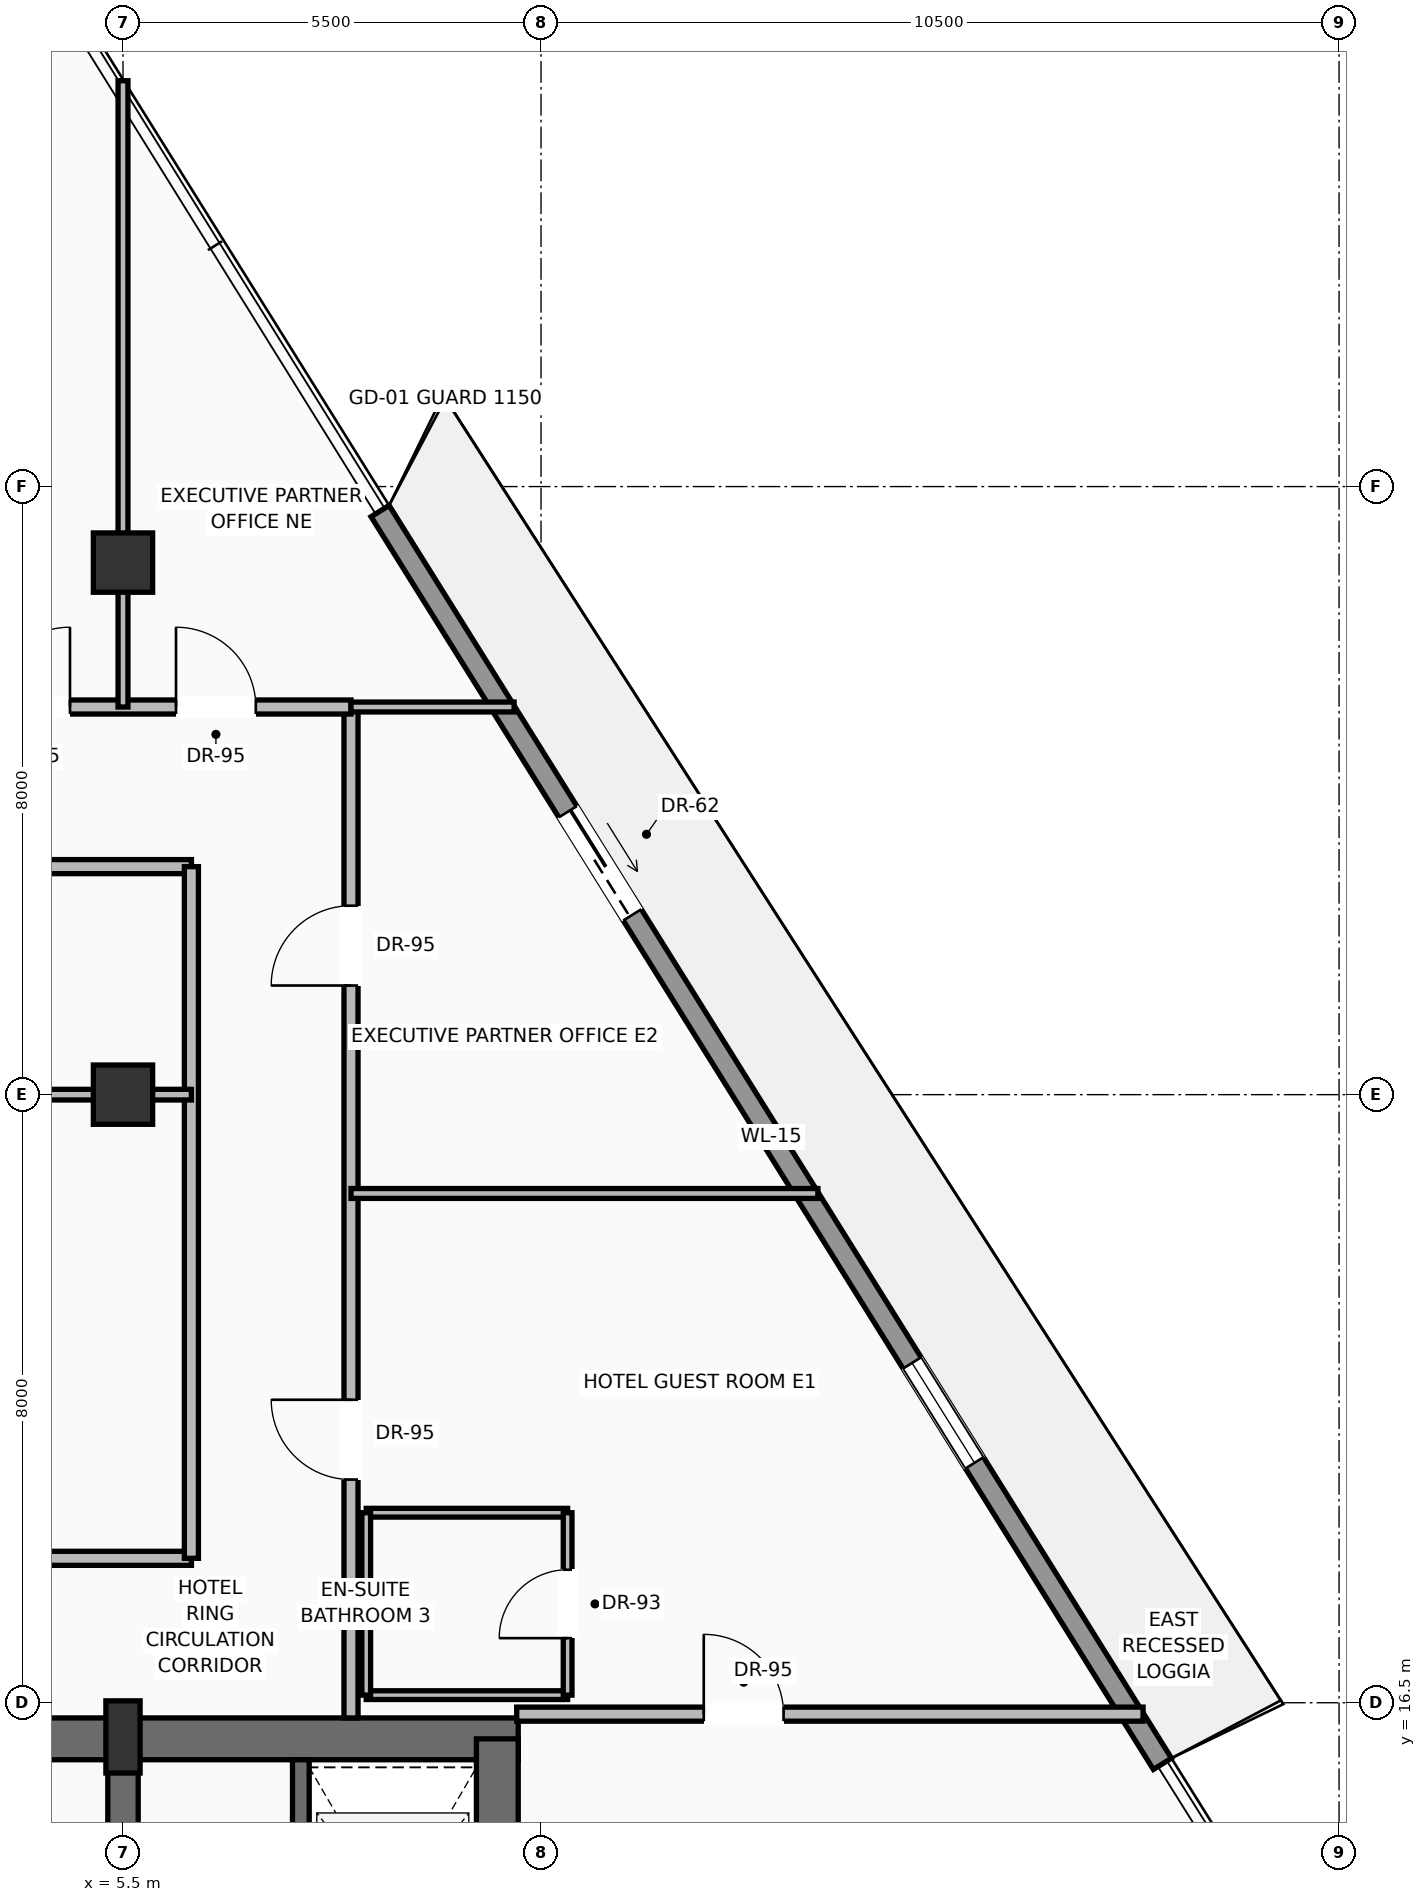
"""IFC4 building model, lengths in metres.
Left out: names, types, materials, properties, quantities, classifications, styles, units other than length and angle.
Written with IfcOpenShell. Run it as: python <this file> out.ifc"""

import sys

from ifc_helpers import new_model, si_unit, direction, frame, frame_2d, origin, origin_2d, place, context, subcontext, project, spatial, rectangle, extrude, source, transform, mapped, element, fill, save


model = new_model("IFC4")
c1 = context("Model", 3, precision=1e-05, world=origin(), true_north=direction((0.0, 1.0)))
c2 = subcontext(c1, "Body", "Model", "MODEL_VIEW")
j1 = project(units=[si_unit("LENGTHUNIT", "METRE"), si_unit("PLANEANGLEUNIT", "RADIAN")], contexts=[c1])
p1 = place(None, origin())
s1 = spatial("IfcSite", under=j1, at=p1, CompositionType="ELEMENT")
p2 = place(p1, origin())
s2 = spatial("IfcBuilding", under=s1, at=p2, CompositionType="ELEMENT")
p3 = place(p2, frame((0.0, 0.0, 223.45)))
s3 = spatial("IfcBuildingStorey", under=s2, at=p3, CompositionType="ELEMENT", Elevation=223.45)
p4 = place(p3, frame((-10.7, 16.025, 0.0), z_axis=(0.0, 0.0, 1.0), x_axis=(1.0, 0.0, 0.0)))
e1 = element("IfcWall", 1, at=p4, inside=s3, PredefinedType="SHEAR", context=c2, shape_type="SweptSolid", body=[
    extrude(rectangle(XDim=21.4, YDim=0.55, at=frame_2d((10.7, 0.0))), origin(), (0.0, 0.0, 1.0), 3.24),
])
p5 = place(p4, frame((3.27, 0.0, 0.0)))
e2 = element("IfcOpeningElement", 2, at=p5, cuts=e1, PredefinedType="OPENING", context=c2, shape_type="SweptSolid", body=[
    extrude(rectangle(XDim=1.3, YDim=2.3, at=frame_2d((0.65, 1.15))), frame((0.0, 0.285, 0.0), z_axis=(0.0, -1.0, 0.0), x_axis=(1.0, 0.0, 0.0)), (0.0, 0.0, 1.0), 0.57),
])
p6 = place(p4, frame((9.7, 0.0, 0.0)))
e3 = element("IfcOpeningElement", 3, at=p6, cuts=e1, PredefinedType="OPENING", context=c2, shape_type="SweptSolid", body=[
    extrude(rectangle(XDim=2.0, YDim=2.4, at=frame_2d((1.0, 1.2))), frame((0.0, 0.285, 0.0), z_axis=(0.0, -1.0, 0.0), x_axis=(1.0, 0.0, 0.0)), (0.0, 0.0, 1.0), 0.57),
])
p7 = place(p3, frame((10.425, 0.575, 0.0), z_axis=(0.0, 0.0, 1.0), x_axis=(0.0, 1.0, 0.0)))
e4 = element("IfcWall", 4, at=p7, inside=s3, PredefinedType="SHEAR", context=c2, shape_type="SweptSolid", body=[
    extrude(rectangle(XDim=15.45, YDim=0.55, at=frame_2d((7.725, 0.0))), origin(), (0.0, 0.0, 1.0), 3.24),
])
p8 = place(p3, frame((5.5, 0.575, 0.0), z_axis=(0.0, 0.0, 1.0), x_axis=(0.0, 1.0, 0.0)))
e5 = element("IfcWall", 5, at=p8, inside=s3, PredefinedType="SHEAR", context=c2, shape_type="SweptSolid", body=[
    extrude(rectangle(XDim=15.45, YDim=0.4, at=frame_2d((7.725, 0.0))), origin(), (0.0, 0.0, 1.0), 3.24),
])
p9 = place(p8, frame((8.925, 0.0, 0.0)))
e6 = element("IfcOpeningElement", 6, at=p9, cuts=e5, PredefinedType="OPENING", context=c2, shape_type="SweptSolid", body=[
    extrude(rectangle(XDim=1.1, YDim=2.2, at=frame_2d((0.55, 1.1))), frame((0.0, 0.21, 0.0), z_axis=(0.0, -1.0, 0.0), x_axis=(1.0, 0.0, 0.0)), (0.0, 0.0, 1.0), 0.42),
])
m1 = source(origin(), c2, "Body", "SweptSolid", [
    extrude(rectangle(XDim=0.45, YDim=0.95, at=origin_2d()), origin(), (0.0, 0.0, 1.0), 3.45),
])
p10 = place(p3, frame((5.5, 16.05, 0.0), z_axis=(0.0, 0.0, 1.0), x_axis=(1.0, 0.0, 0.0)))
e7 = element("IfcColumn", 7, at=p10, inside=s3, PredefinedType="PILASTER", context=c2, shape_type="MappedRepresentation", body=[
    mapped(m1, transform((0.0, 0.0, 0.0), scale=1.0)),
])
m2 = source(origin(), c2, "Body", "SweptSolid", [
    extrude(rectangle(XDim=0.78, YDim=0.78, at=origin_2d()), origin(), (0.0, 0.0, 1.0), 3.45),
])
for number, where, z_axis, x_axis in (
    (8, (5.5, 24.5, 0.0), (0.0, 0.0, 1.0), (1.0, 0.0, 0.0)),
    (9, (5.5, 31.5, 0.0), (0.0, 0.0, 1.0), (1.0, 0.0, 0.0)),
):
    element("IfcColumn", number, at=place(p3, frame(where, z_axis=z_axis, x_axis=x_axis)), inside=s3, PredefinedType="COLUMN", context=c2, shape_type="MappedRepresentation", body=[
        mapped(m2, transform((0.0, 0.0, 0.0), scale=1.0)),
    ])
p11 = place(p3, frame((8.883, 32.178, 0.0), z_axis=(0.0, 0.0, 1.0), x_axis=(0.529719957473, -0.848172604282, 0.0)))
e10 = element("IfcWall", 10, at=p11, inside=s3, PredefinedType="SOLIDWALL", context=c2, shape_type="SweptSolid", body=[
    extrude(rectangle(XDim=19.431, YDim=0.28, at=frame_2d((9.716, 0.0))), origin(), (0.0, 0.0, 1.0), 2.82),
])
p12 = place(p11, frame((4.664, 0.0, 0.0)))
e11 = element("IfcOpeningElement", 11, at=p12, cuts=e10, PredefinedType="OPENING", context=c2, shape_type="SweptSolid", body=[
    extrude(rectangle(XDim=1.6, YDim=2.35, at=frame_2d((0.8, 1.175))), frame((0.0, 0.15, 0.0), z_axis=(0.0, -1.0, 0.0), x_axis=(1.0, 0.0, 0.0)), (0.0, 0.0, 1.0), 0.3),
])
p13 = place(p11, frame((13.213, 0.0, 0.9)))
e12 = element("IfcOpeningElement", 12, at=p13, cuts=e10, PredefinedType="OPENING", context=c2, shape_type="SweptSolid", body=[
    extrude(rectangle(XDim=1.55, YDim=1.75, at=frame_2d((0.775, 0.875))), frame((0.0, 0.15, 0.0), z_axis=(0.0, -1.0, 0.0), x_axis=(1.0, 0.0, 0.0)), (0.0, 0.0, 1.0), 0.3),
])
p14 = place(p3, frame((7.84, 11.87, 0.0), z_axis=(0.0, 0.0, 1.0), x_axis=(0.0, 1.0, 0.0)))
e13 = element("IfcWall", 13, at=p14, inside=s3, PredefinedType="SOLIDWALL", context=c2, shape_type="SweptSolid", body=[
    extrude(rectangle(XDim=3.88, YDim=0.22, at=frame_2d((1.94, 0.0))), origin(), (0.0, 0.0, 1.0), 3.24),
])
p15 = place(p3, frame((-6.4, 18.4, 0.0), z_axis=(0.0, 0.0, 1.0), x_axis=(1.0, 0.0, 0.0)))
e14 = element("IfcWall", 14, at=p15, inside=s3, PredefinedType="PARTITIONING", context=c2, shape_type="SweptSolid", body=[
    extrude(rectangle(XDim=12.8, YDim=0.185, at=frame_2d((6.4, 0.0))), origin(), (0.0, 0.0, 1.0), 3.232),
])
p16 = place(p15, frame((5.925, 0.0, 0.0)))
e15 = element("IfcOpeningElement", 15, at=p16, cuts=e14, PredefinedType="OPENING", context=c2, shape_type="SweptSolid", body=[
    extrude(rectangle(XDim=0.95, YDim=2.2, at=frame_2d((0.475, 1.1))), frame((0.0, 0.103, 0.0), z_axis=(0.0, -1.0, 0.0), x_axis=(1.0, 0.0, 0.0)), (0.0, 0.0, 1.0), 0.205),
])
p17 = place(p3, frame((-6.4, 27.5, 0.0), z_axis=(0.0, 0.0, 1.0), x_axis=(1.0, 0.0, 0.0)))
e16 = element("IfcWall", 16, at=p17, inside=s3, PredefinedType="PARTITIONING", context=c2, shape_type="SweptSolid", body=[
    extrude(rectangle(XDim=12.8, YDim=0.185, at=frame_2d((6.4, 0.0))), origin(), (0.0, 0.0, 1.0), 3.232),
])
p18 = place(p17, frame((5.925, 0.0, 0.0)))
e17 = element("IfcOpeningElement", 17, at=p18, cuts=e16, PredefinedType="OPENING", context=c2, shape_type="SweptSolid", body=[
    extrude(rectangle(XDim=0.95, YDim=2.2, at=frame_2d((0.475, 1.1))), frame((0.0, 0.103, 0.0), z_axis=(0.0, -1.0, 0.0), x_axis=(1.0, 0.0, 0.0)), (0.0, 0.0, 1.0), 0.205),
])
p19 = place(p3, frame((6.4, 18.4, 0.0), z_axis=(0.0, 0.0, 1.0), x_axis=(0.0, 1.0, 0.0)))
e18 = element("IfcWall", 18, at=p19, inside=s3, PredefinedType="PARTITIONING", context=c2, shape_type="SweptSolid", body=[
    extrude(rectangle(XDim=9.1, YDim=0.185, at=frame_2d((4.55, 0.0))), origin(), (0.0, 0.0, 1.0), 3.232),
])
p20 = place(p3, frame((8.5, 16.3, 0.0), z_axis=(0.0, 0.0, 1.0), x_axis=(0.0, 1.0, 0.0)))
e19 = element("IfcWall", 19, at=p20, inside=s3, PredefinedType="PARTITIONING", context=c2, shape_type="SweptSolid", body=[
    extrude(rectangle(XDim=13.3, YDim=0.185, at=frame_2d((6.65, 0.0))), origin(), (0.0, 0.0, 1.0), 3.232),
])
p21 = place(p20, frame((3.136, 0.0, 0.0)))
e20 = element("IfcOpeningElement", 20, at=p21, cuts=e19, PredefinedType="OPENING", context=c2, shape_type="SweptSolid", body=[
    extrude(rectangle(XDim=1.05, YDim=2.25, at=frame_2d((0.525, 1.125))), frame((0.0, 0.103, 0.0), z_axis=(0.0, -1.0, 0.0), x_axis=(1.0, 0.0, 0.0)), (0.0, 0.0, 1.0), 0.205),
])
p22 = place(p20, frame((9.636, 0.0, 0.0)))
e21 = element("IfcOpeningElement", 21, at=p22, cuts=e19, PredefinedType="OPENING", context=c2, shape_type="SweptSolid", body=[
    extrude(rectangle(XDim=1.05, YDim=2.25, at=frame_2d((0.525, 1.125))), frame((0.0, 0.103, 0.0), z_axis=(0.0, -1.0, 0.0), x_axis=(1.0, 0.0, 0.0)), (0.0, 0.0, 1.0), 0.205),
])
p23 = place(p3, frame((-8.5, 29.6, 0.0), z_axis=(0.0, 0.0, 1.0), x_axis=(1.0, 0.0, 0.0)))
e22 = element("IfcWall", 22, at=p23, inside=s3, PredefinedType="PARTITIONING", context=c2, shape_type="SweptSolid", body=[
    extrude(rectangle(XDim=17.0, YDim=0.185, at=frame_2d((8.5, 0.0))), origin(), (0.0, 0.0, 1.0), 3.232),
])
p24 = place(p23, frame((3.698, 0.0, 0.0)))
e23 = element("IfcOpeningElement", 23, at=p24, cuts=e22, PredefinedType="OPENING", context=c2, shape_type="SweptSolid", body=[
    extrude(rectangle(XDim=1.05, YDim=2.25, at=frame_2d((0.525, 1.125))), frame((0.0, 0.103, 0.0), z_axis=(0.0, -1.0, 0.0), x_axis=(1.0, 0.0, 0.0)), (0.0, 0.0, 1.0), 0.205),
])
p25 = place(p23, frame((7.975, 0.0, 0.0)))
e24 = element("IfcOpeningElement", 24, at=p25, cuts=e22, PredefinedType="OPENING", context=c2, shape_type="SweptSolid", body=[
    extrude(rectangle(XDim=1.05, YDim=2.25, at=frame_2d((0.525, 1.125))), frame((0.0, 0.103, 0.0), z_axis=(0.0, -1.0, 0.0), x_axis=(1.0, 0.0, 0.0)), (0.0, 0.0, 1.0), 0.205),
])
p26 = place(p23, frame((12.252, 0.0, 0.0)))
e25 = element("IfcOpeningElement", 25, at=p26, cuts=e22, PredefinedType="OPENING", context=c2, shape_type="SweptSolid", body=[
    extrude(rectangle(XDim=1.05, YDim=2.25, at=frame_2d((0.525, 1.125))), frame((0.0, 0.103, 0.0), z_axis=(0.0, -1.0, 0.0), x_axis=(1.0, 0.0, 0.0)), (0.0, 0.0, 1.0), 0.205),
])
p27 = place(p23, frame((14.698, 0.0, 0.0)))
e26 = element("IfcOpeningElement", 26, at=p27, cuts=e22, PredefinedType="OPENING", context=c2, shape_type="SweptSolid", body=[
    extrude(rectangle(XDim=1.05, YDim=2.25, at=frame_2d((0.525, 1.125))), frame((0.0, 0.103, 0.0), z_axis=(0.0, -1.0, 0.0), x_axis=(1.0, 0.0, 0.0)), (0.0, 0.0, 1.0), 0.205),
])
p28 = place(p23, frame((1.252, 0.0, 0.0)))
e27 = element("IfcOpeningElement", 27, at=p28, cuts=e22, PredefinedType="OPENING", context=c2, shape_type="SweptSolid", body=[
    extrude(rectangle(XDim=1.05, YDim=2.25, at=frame_2d((0.525, 1.125))), frame((0.0, 0.103, 0.0), z_axis=(0.0, -1.0, 0.0), x_axis=(1.0, 0.0, 0.0)), (0.0, 0.0, 1.0), 0.205),
])
p29 = place(p3, frame((-6.4, 24.5, 0.0), z_axis=(0.0, 0.0, 1.0), x_axis=(1.0, 0.0, 0.0)))
e28 = element("IfcWall", 28, at=p29, inside=s3, PredefinedType="PARTITIONING", context=c2, shape_type="SweptSolid", body=[
    extrude(rectangle(XDim=12.8, YDim=0.14, at=frame_2d((6.4, 0.0))), origin(), (0.0, 0.0, 1.0), 2.683),
])
p30 = place(p3, frame((10.68, 16.35, 0.0), z_axis=(0.0, 0.0, 1.0), x_axis=(1.0, 0.0, 0.0)))
e29 = element("IfcWall", 29, at=p30, inside=s3, PredefinedType="PARTITIONING", context=c2, shape_type="SweptSolid", body=[
    extrude(rectangle(XDim=8.241, YDim=0.185, at=frame_2d((4.121, 0.0))), origin(), (0.0, 0.0, 1.0), 3.232),
])
p31 = place(p30, frame((2.461, 0.0, 0.0)))
e30 = element("IfcOpeningElement", 30, at=p31, cuts=e29, PredefinedType="OPENING", context=c2, shape_type="SweptSolid", body=[
    extrude(rectangle(XDim=1.05, YDim=2.25, at=frame_2d((0.525, 1.125))), frame((0.0, 0.103, 0.0), z_axis=(0.0, -1.0, 0.0), x_axis=(1.0, 0.0, 0.0)), (0.0, 0.0, 1.0), 0.205),
])
p32 = place(p3, frame((8.5, 29.6, 0.0), z_axis=(0.0, 0.0, 1.0), x_axis=(1.0, 0.0, 0.0)))
e31 = element("IfcWall", 31, at=p32, inside=s3, PredefinedType="PARTITIONING", context=c2, shape_type="SweptSolid", body=[
    extrude(rectangle(XDim=2.146, YDim=0.13, at=frame_2d((1.073, 0.0))), origin(), (0.0, 0.0, 1.0), 3.232),
])
p33 = place(p3, frame((5.5, 29.6, 0.0), z_axis=(0.0, 0.0, 1.0), x_axis=(0.0, 1.0, 0.0)))
e32 = element("IfcWall", 32, at=p33, inside=s3, PredefinedType="PARTITIONING", context=c2, shape_type="SweptSolid", body=[
    extrude(rectangle(XDim=8.239, YDim=0.13, at=frame_2d((4.12, 0.0))), origin(), (0.0, 0.0, 1.0), 2.683),
])
for number, where, z_axis, x_axis in (
    (33, (8.7, 16.6, 0.0), (0.0, 0.0, 1.0), (1.0, 0.0, 0.0)),
    (34, (8.7, 19.0, 0.0), (0.0, 0.0, 1.0), (1.0, 0.0, 0.0)),
):
    element("IfcWall", number, at=place(p3, frame(where, z_axis=z_axis, x_axis=x_axis)), inside=s3, PredefinedType="PARTITIONING", context=c2, shape_type="SweptSolid", body=[
        extrude(rectangle(XDim=2.65, YDim=0.115, at=frame_2d((1.325, 0.0))), origin(), (0.0, 0.0, 1.0), 3.232),
    ])
p34 = place(p3, frame((8.7, 16.6, 0.0), z_axis=(0.0, 0.0, 1.0), x_axis=(0.0, 1.0, 0.0)))
e35 = element("IfcWall", 35, at=p34, inside=s3, PredefinedType="PARTITIONING", context=c2, shape_type="SweptSolid", body=[
    extrude(rectangle(XDim=2.4, YDim=0.115, at=frame_2d((1.2, 0.0))), origin(), (0.0, 0.0, 1.0), 3.232),
])
p35 = place(p3, frame((11.35, 16.6, 0.0), z_axis=(0.0, 0.0, 1.0), x_axis=(0.0, 1.0, 0.0)))
e36 = element("IfcWall", 36, at=p35, inside=s3, PredefinedType="PARTITIONING", context=c2, shape_type="SweptSolid", body=[
    extrude(rectangle(XDim=2.4, YDim=0.115, at=frame_2d((1.2, 0.0))), origin(), (0.0, 0.0, 1.0), 3.232),
])
p36 = place(p35, frame((0.75, 0.0, 0.0)))
e37 = element("IfcOpeningElement", 37, at=p36, cuts=e36, PredefinedType="OPENING", context=c2, shape_type="SweptSolid", body=[
    extrude(rectangle(XDim=0.9, YDim=2.15, at=frame_2d((0.45, 1.075))), frame((0.0, 0.067, 0.0), z_axis=(0.0, -1.0, 0.0), x_axis=(1.0, 0.0, 0.0)), (0.0, 0.0, 1.0), 0.135),
])
p37 = place(p3, frame((8.5, 23.2, 0.0), z_axis=(0.0, 0.0, 1.0), x_axis=(1.0, 0.0, 0.0)))
e38 = element("IfcWall", 38, at=p37, inside=s3, PredefinedType="PARTITIONING", context=c2, shape_type="SweptSolid", body=[
    extrude(rectangle(XDim=6.143, YDim=0.13, at=frame_2d((3.071, 0.0))), origin(), (0.0, 0.0, 1.0), 3.232),
])
m3 = source(origin(), c2, "Body", "SweptSolid", [
    extrude(rectangle(XDim=1.6, YDim=2.35, at=frame_2d((0.8, 1.175))), frame((0.0, 0.025, 0.0), z_axis=(0.0, -1.0, 0.0), x_axis=(1.0, 0.0, 0.0)), (0.0, 0.0, 1.0), 0.05),
])
p38 = place(p12, origin())
e39 = element("IfcDoor", 39, at=p38, inside=s3, OperationType="SLIDING_TO_RIGHT", PredefinedType="DOOR", context=c2, shape_type="MappedRepresentation", body=[
    mapped(m3, transform((0.0, 0.0, 0.0), scale=1.0)),
])
fill(e11, e39)
m4 = source(origin(), c2, "Body", "SweptSolid", [
    extrude(rectangle(XDim=1.55, YDim=1.75, at=frame_2d((0.775, 0.875))), frame((0.0, 0.03, 0.0), z_axis=(0.0, -1.0, 0.0), x_axis=(1.0, 0.0, 0.0)), (0.0, 0.0, 1.0), 0.06),
])
p39 = place(p13, origin())
e40 = element("IfcWindow", 40, at=p39, inside=s3, PartitioningType="SINGLE_PANEL", PredefinedType="WINDOW", context=c2, shape_type="MappedRepresentation", body=[
    mapped(m4, transform((0.0, 0.0, 0.0), scale=1.0)),
])
fill(e12, e40)
m5 = source(origin(), c2, "Body", "SweptSolid", [
    extrude(rectangle(XDim=1.05, YDim=2.25, at=frame_2d((0.525, 1.125))), frame((0.0, 0.025, 0.0), z_axis=(0.0, -1.0, 0.0), x_axis=(1.0, 0.0, 0.0)), (0.0, 0.0, 1.0), 0.05),
])
p40 = place(p31, origin())
e41 = element("IfcDoor", 41, at=p40, inside=s3, OperationType="SINGLE_SWING_LEFT", PredefinedType="DOOR", context=c2, shape_type="MappedRepresentation", body=[
    mapped(m5, transform((0.0, 0.0, 0.0), scale=1.0)),
])
fill(e30, e41)
m6 = source(origin(), c2, "Body", "SweptSolid", [
    extrude(rectangle(XDim=0.9, YDim=2.15, at=frame_2d((0.45, 1.075))), frame((0.0, 0.025, 0.0), z_axis=(0.0, -1.0, 0.0), x_axis=(1.0, 0.0, 0.0)), (0.0, 0.0, 1.0), 0.05),
])
p41 = place(p36, origin())
e42 = element("IfcDoor", 42, at=p41, inside=s3, OperationType="SINGLE_SWING_LEFT", PredefinedType="DOOR", context=c2, shape_type="MappedRepresentation", body=[
    mapped(m6, transform((0.0, 0.0, 0.0), scale=1.0)),
])
fill(e37, e42)
p42 = place(p21, origin())
e43 = element("IfcDoor", 43, at=p42, inside=s3, OperationType="SINGLE_SWING_RIGHT", PredefinedType="DOOR", context=c2, shape_type="MappedRepresentation", body=[
    mapped(m5, transform((0.0, 0.0, 0.0), scale=1.0)),
])
fill(e20, e43)
p43 = place(p22, origin())
e44 = element("IfcDoor", 44, at=p43, inside=s3, OperationType="SINGLE_SWING_LEFT", PredefinedType="DOOR", context=c2, shape_type="MappedRepresentation", body=[
    mapped(m5, transform((0.0, 0.0, 0.0), scale=1.0)),
])
fill(e21, e44)
p44 = place(p26, origin())
e45 = element("IfcDoor", 45, at=p44, inside=s3, OperationType="SINGLE_SWING_RIGHT", PredefinedType="DOOR", context=c2, shape_type="MappedRepresentation", body=[
    mapped(m5, transform((0.0, 0.0, 0.0), scale=1.0)),
])
fill(e25, e45)
p45 = place(p27, origin())
e46 = element("IfcDoor", 46, at=p45, inside=s3, OperationType="SINGLE_SWING_LEFT", PredefinedType="DOOR", context=c2, shape_type="MappedRepresentation", body=[
    mapped(m5, transform((0.0, 0.0, 0.0), scale=1.0)),
])
fill(e26, e46)
save(model, sys.argv[1])
